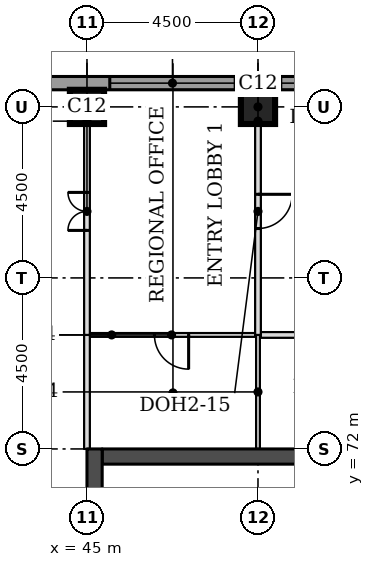
"""IFC4 building model, lengths in metres.
Left out: names, types, materials, properties, quantities, classifications, styles, units other than length and angle.
Written with IfcOpenShell. Run it as: python <this file> out.ifc"""

import sys

from ifc_helpers import new_model, si_unit, direction, frame, frame_2d, origin, origin_2d, place, context, subcontext, project, spatial, rectangle, extrude, element, fill, save


model = new_model("IFC4")
c1 = context("Model", 3, precision=1e-05, world=origin(), true_north=direction((0.0, 1.0)))
c2 = subcontext(c1, "Body", "Model", "MODEL_VIEW")
j1 = project(units=[si_unit("LENGTHUNIT", "METRE"), si_unit("PLANEANGLEUNIT", "RADIAN")], contexts=[c1])
p1 = place(None, origin())
s1 = spatial("IfcSite", under=j1, at=p1, CompositionType="ELEMENT")
p2 = place(p1, origin())
s2 = spatial("IfcBuilding", under=s1, at=p2, CompositionType="ELEMENT")
p3 = place(p2, frame((0.0, 0.0, 155.1)))
s3 = spatial("IfcBuildingStorey", under=s2, at=p3, CompositionType="ELEMENT", Elevation=155.1)
for number, where, z_axis, x_axis in (
    (1, (45.0, 81.0, 0.0), (0.0, 0.0, 1.0), (1.0, 0.0, 0.0)),
    (2, (49.5, 81.0, 0.0), (0.0, 0.0, 1.0), (1.0, 0.0, 0.0)),
):
    element("IfcColumn", number, at=place(p3, frame(where, z_axis=z_axis, x_axis=x_axis)), inside=s3, PredefinedType="COLUMN", context=c2, shape_type="SweptSolid", body=[
        extrude(rectangle(XDim=0.9, YDim=0.9, at=origin_2d()), origin(), (0.0, 0.0, 1.0), 3.7),
    ])
p4 = place(p3, frame((45.4, 71.8, 0.0), z_axis=(0.0, 0.0, 1.0), x_axis=(1.0, 0.0, 0.0)))
e3 = element("IfcWall", 3, at=p4, inside=s3, PredefinedType="SHEAR", context=c2, shape_type="SweptSolid", body=[
    extrude(rectangle(XDim=21.7, YDim=0.4, at=frame_2d((10.85, 0.0))), origin(), (0.0, 0.0, 1.0), 3.7),
])
p5 = place(p3, frame((45.2, 49.5, 0.0), z_axis=(0.0, 0.0, 1.0), x_axis=(0.0, 1.0, 0.0)))
e4 = element("IfcWall", 4, at=p5, inside=s3, PredefinedType="SHEAR", context=c2, shape_type="SweptSolid", body=[
    extrude(rectangle(XDim=22.5, YDim=0.4, at=frame_2d((11.25, 0.0))), origin(), (0.0, 0.0, 1.0), 3.7),
])
p6 = place(p5, frame((4.2, 0.0, 0.0)))
e5 = element("IfcOpeningElement", 5, at=p6, cuts=e4, PredefinedType="OPENING", context=c2, shape_type="SweptSolid", body=[
    extrude(rectangle(XDim=1.8, YDim=2.1, at=frame_2d((0.9, 1.05))), frame((0.0, 0.21, 0.0), z_axis=(0.0, -1.0, 0.0), x_axis=(1.0, 0.0, 0.0)), (0.0, 0.0, 1.0), 0.42),
])
p7 = place(p5, frame((6.9, 0.0, 0.0)))
e6 = element("IfcOpeningElement", 6, at=p7, cuts=e4, PredefinedType="OPENING", context=c2, shape_type="SweptSolid", body=[
    extrude(rectangle(XDim=1.1, YDim=2.1, at=frame_2d((0.55, 1.05))), frame((0.0, 0.21, 0.0), z_axis=(0.0, -1.0, 0.0), x_axis=(1.0, 0.0, 0.0)), (0.0, 0.0, 1.0), 0.42),
])
p8 = place(p5, frame((13.6, 0.0, 0.0)))
e7 = element("IfcOpeningElement", 7, at=p8, cuts=e4, PredefinedType="OPENING", context=c2, shape_type="SweptSolid", body=[
    extrude(rectangle(XDim=1.1, YDim=2.1, at=frame_2d((0.55, 1.05))), frame((0.0, 0.21, 0.0), z_axis=(0.0, -1.0, 0.0), x_axis=(1.0, 0.0, 0.0)), (0.0, 0.0, 1.0), 0.42),
])
p9 = place(p5, frame((16.5, 0.0, 0.0)))
e8 = element("IfcOpeningElement", 8, at=p9, cuts=e4, PredefinedType="OPENING", context=c2, shape_type="SweptSolid", body=[
    extrude(rectangle(XDim=1.8, YDim=2.1, at=frame_2d((0.9, 1.05))), frame((0.0, 0.21, 0.0), z_axis=(0.0, -1.0, 0.0), x_axis=(1.0, 0.0, 0.0)), (0.0, 0.0, 1.0), 0.42),
])
p10 = place(p3, frame((72.331, 81.625, 0.0), z_axis=(0.0, 0.0, 1.0), x_axis=(-1.0, 0.0, 0.0)))
e9 = element("IfcWall", 9, at=p10, inside=s3, PredefinedType="STANDARD", context=c2, shape_type="SweptSolid", body=[
    extrude(rectangle(XDim=32.163, YDim=0.35, at=frame_2d((16.081, 0.0))), origin(), (0.0, 0.0, 1.0), 3.525),
])
p11 = place(p10, frame((5.431, 0.0, 0.9)))
e10 = element("IfcOpeningElement", 10, at=p11, cuts=e9, PredefinedType="OPENING", context=c2, shape_type="SweptSolid", body=[
    extrude(rectangle(XDim=3.3, YDim=1.9, at=frame_2d((1.65, 0.95))), frame((0.0, 0.185, 0.0), z_axis=(0.0, -1.0, 0.0), x_axis=(1.0, 0.0, 0.0)), (0.0, 0.0, 1.0), 0.37),
])
p12 = place(p10, frame((9.931, 0.0, 0.9)))
e11 = element("IfcOpeningElement", 11, at=p12, cuts=e9, PredefinedType="OPENING", context=c2, shape_type="SweptSolid", body=[
    extrude(rectangle(XDim=3.3, YDim=1.9, at=frame_2d((1.65, 0.95))), frame((0.0, 0.185, 0.0), z_axis=(0.0, -1.0, 0.0), x_axis=(1.0, 0.0, 0.0)), (0.0, 0.0, 1.0), 0.37),
])
p13 = place(p10, frame((14.431, 0.0, 0.9)))
e12 = element("IfcOpeningElement", 12, at=p13, cuts=e9, PredefinedType="OPENING", context=c2, shape_type="SweptSolid", body=[
    extrude(rectangle(XDim=3.3, YDim=1.9, at=frame_2d((1.65, 0.95))), frame((0.0, 0.185, 0.0), z_axis=(0.0, -1.0, 0.0), x_axis=(1.0, 0.0, 0.0)), (0.0, 0.0, 1.0), 0.37),
])
p14 = place(p10, frame((18.931, 0.0, 0.9)))
e13 = element("IfcOpeningElement", 13, at=p14, cuts=e9, PredefinedType="OPENING", context=c2, shape_type="SweptSolid", body=[
    extrude(rectangle(XDim=3.3, YDim=1.9, at=frame_2d((1.65, 0.95))), frame((0.0, 0.185, 0.0), z_axis=(0.0, -1.0, 0.0), x_axis=(1.0, 0.0, 0.0)), (0.0, 0.0, 1.0), 0.37),
])
p15 = place(p10, frame((23.431, 0.0, 0.9)))
e14 = element("IfcOpeningElement", 14, at=p15, cuts=e9, PredefinedType="OPENING", context=c2, shape_type="SweptSolid", body=[
    extrude(rectangle(XDim=3.3, YDim=1.9, at=frame_2d((1.65, 0.95))), frame((0.0, 0.185, 0.0), z_axis=(0.0, -1.0, 0.0), x_axis=(1.0, 0.0, 0.0)), (0.0, 0.0, 1.0), 0.37),
])
p16 = place(p3, frame((45.075, 75.0, 0.0), z_axis=(0.0, 0.0, 1.0), x_axis=(1.0, 0.0, 0.0)))
e15 = element("IfcWall", 15, at=p16, inside=s3, PredefinedType="PARTITIONING", context=c2, shape_type="SweptSolid", body=[
    extrude(rectangle(XDim=4.35, YDim=0.1, at=frame_2d((2.175, 0.0))), origin(), (0.0, 0.0, 1.0), 3.55),
])
p17 = place(p16, frame((1.7, 0.0, 0.0)))
e16 = element("IfcOpeningElement", 16, at=p17, cuts=e15, PredefinedType="OPENING", context=c2, shape_type="SweptSolid", body=[
    extrude(rectangle(XDim=0.9, YDim=2.1, at=frame_2d((0.45, 1.05))), frame((0.0, 0.06, 0.0), z_axis=(0.0, -1.0, 0.0), x_axis=(1.0, 0.0, 0.0)), (0.0, 0.0, 1.0), 0.12),
])
p18 = place(p3, frame((49.575, 75.0, 0.0), z_axis=(0.0, 0.0, 1.0), x_axis=(1.0, 0.0, 0.0)))
e17 = element("IfcWall", 17, at=p18, inside=s3, PredefinedType="PARTITIONING", context=c2, shape_type="SweptSolid", body=[
    extrude(rectangle(XDim=4.425, YDim=0.15, at=frame_2d((2.212, 0.0))), origin(), (0.0, 0.0, 1.0), 3.55),
])
p19 = place(p18, frame((1.75, 0.0, 0.0)))
e18 = element("IfcOpeningElement", 18, at=p19, cuts=e17, PredefinedType="OPENING", context=c2, shape_type="SweptSolid", body=[
    extrude(rectangle(XDim=0.9, YDim=2.1, at=frame_2d((0.45, 1.05))), frame((0.0, 0.085, 0.0), z_axis=(0.0, -1.0, 0.0), x_axis=(1.0, 0.0, 0.0)), (0.0, 0.0, 1.0), 0.17),
])
p20 = place(p3, frame((45.0, 72.0, 0.0), z_axis=(0.0, 0.0, 1.0), x_axis=(0.0, 1.0, 0.0)))
e19 = element("IfcWall", 19, at=p20, inside=s3, PredefinedType="PARTITIONING", context=c2, shape_type="SweptSolid", body=[
    extrude(rectangle(XDim=3.0, YDim=0.15, at=frame_2d((1.5, 0.0))), origin(), (0.0, 0.0, 1.0), 3.022),
])
p21 = place(p3, frame((49.5, 72.0, 0.0), z_axis=(0.0, 0.0, 1.0), x_axis=(0.0, 1.0, 0.0)))
e20 = element("IfcWall", 20, at=p21, inside=s3, PredefinedType="PARTITIONING", context=c2, shape_type="SweptSolid", body=[
    extrude(rectangle(XDim=3.0, YDim=0.1, at=frame_2d((1.5, 0.0))), origin(), (0.0, 0.0, 1.0), 3.55),
])
p22 = place(p3, frame((45.0, 75.0, 0.0), z_axis=(0.0, 0.0, 1.0), x_axis=(0.0, 1.0, 0.0)))
e21 = element("IfcWall", 21, at=p22, inside=s3, PredefinedType="PARTITIONING", context=c2, shape_type="SweptSolid", body=[
    extrude(rectangle(XDim=6.45, YDim=0.15, at=frame_2d((3.225, 0.0))), origin(), (0.0, 0.0, 1.0), 3.022),
])
p23 = place(p22, frame((2.75, 0.0, 0.0)))
e22 = element("IfcOpeningElement", 22, at=p23, cuts=e21, PredefinedType="OPENING", context=c2, shape_type="SweptSolid", body=[
    extrude(rectangle(XDim=1.0, YDim=2.1, at=frame_2d((0.5, 1.05))), frame((0.0, 0.085, 0.0), z_axis=(0.0, -1.0, 0.0), x_axis=(1.0, 0.0, 0.0)), (0.0, 0.0, 1.0), 0.17),
])
p24 = place(p3, frame((49.5, 75.0, 0.0), z_axis=(0.0, 0.0, 1.0), x_axis=(0.0, 1.0, 0.0)))
e23 = element("IfcWall", 23, at=p24, inside=s3, PredefinedType="PARTITIONING", context=c2, shape_type="SweptSolid", body=[
    extrude(rectangle(XDim=6.45, YDim=0.15, at=frame_2d((3.225, 0.0))), origin(), (0.0, 0.0, 1.0), 3.55),
])
p25 = place(p24, frame((2.8, 0.0, 0.0)))
e24 = element("IfcOpeningElement", 24, at=p25, cuts=e23, PredefinedType="OPENING", context=c2, shape_type="SweptSolid", body=[
    extrude(rectangle(XDim=0.9, YDim=2.1, at=frame_2d((0.45, 1.05))), frame((0.0, 0.085, 0.0), z_axis=(0.0, -1.0, 0.0), x_axis=(1.0, 0.0, 0.0)), (0.0, 0.0, 1.0), 0.17),
])
p26 = place(p14, origin())
e25 = element("IfcWindow", 25, at=p26, inside=s3, PartitioningType="SINGLE_PANEL", PredefinedType="WINDOW", context=c2, shape_type="SweptSolid", body=[
    extrude(rectangle(XDim=3.3, YDim=1.9, at=frame_2d((1.65, 0.95))), frame((0.0, 0.085, 0.0), z_axis=(0.0, -1.0, 0.0), x_axis=(1.0, 0.0, 0.0)), (0.0, 0.0, 1.0), 0.06),
])
fill(e13, e25)
p27 = place(p15, origin())
e26 = element("IfcWindow", 26, at=p27, inside=s3, PartitioningType="SINGLE_PANEL", PredefinedType="WINDOW", context=c2, shape_type="SweptSolid", body=[
    extrude(rectangle(XDim=3.3, YDim=1.9, at=frame_2d((1.65, 0.95))), frame((0.0, 0.085, 0.0), z_axis=(0.0, -1.0, 0.0), x_axis=(1.0, 0.0, 0.0)), (0.0, 0.0, 1.0), 0.06),
])
fill(e14, e26)
p28 = place(p23, origin())
e27 = element("IfcDoor", 27, at=p28, inside=s3, OperationType="DOUBLE_DOOR_SINGLE_SWING", PredefinedType="DOOR", context=c2, shape_type="SweptSolid", body=[
    extrude(rectangle(XDim=1.0, YDim=2.1, at=frame_2d((0.5, 1.05))), frame((0.0, 0.025, 0.0), z_axis=(0.0, -1.0, 0.0), x_axis=(1.0, 0.0, 0.0)), (0.0, 0.0, 1.0), 0.05),
])
fill(e22, e27)
p29 = place(p25, frame((0.9, 0.0, 0.0), z_axis=(0.0, 0.0, 1.0), x_axis=(-1.0, 0.0, 0.0)))
e28 = element("IfcDoor", 28, at=p29, inside=s3, OperationType="SINGLE_SWING_LEFT", PredefinedType="DOOR", context=c2, shape_type="SweptSolid", body=[
    extrude(rectangle(XDim=0.9, YDim=2.1, at=frame_2d((0.45, 1.05))), frame((0.0, 0.025, 0.0), z_axis=(0.0, -1.0, 0.0), x_axis=(1.0, 0.0, 0.0)), (0.0, 0.0, 1.0), 0.05),
])
fill(e24, e28)
p30 = place(p17, frame((0.9, 0.0, 0.0), z_axis=(0.0, 0.0, 1.0), x_axis=(-1.0, 0.0, 0.0)))
e29 = element("IfcDoor", 29, at=p30, inside=s3, OperationType="SINGLE_SWING_LEFT", PredefinedType="DOOR", context=c2, shape_type="SweptSolid", body=[
    extrude(rectangle(XDim=0.9, YDim=2.1, at=frame_2d((0.45, 1.05))), frame((0.0, 0.025, 0.0), z_axis=(0.0, -1.0, 0.0), x_axis=(1.0, 0.0, 0.0)), (0.0, 0.0, 1.0), 0.05),
])
fill(e16, e29)
save(model, sys.argv[1])
